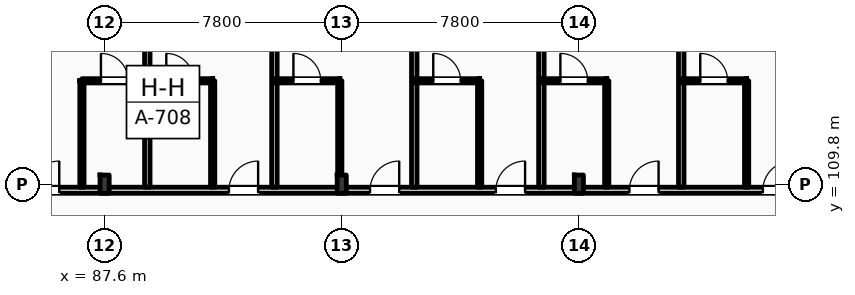
"""IFC4 building model, lengths in metres.
Left out: names, types, materials, properties, quantities, classifications, styles, units other than length and angle.
Written with IfcOpenShell. Run it as: python <this file> out.ifc"""

import sys

from ifc_helpers import new_model, si_unit, direction, frame, frame_2d, origin, origin_2d, place, context, subcontext, project, spatial, rectangle, i_section, extrude, element, fill, save


model = new_model("IFC4")
c1 = context("Model", 3, precision=1e-05, world=origin(), true_north=direction((0.0, 1.0)))
c2 = subcontext(c1, "Body", "Model", "MODEL_VIEW")
j1 = project(units=[si_unit("LENGTHUNIT", "METRE"), si_unit("PLANEANGLEUNIT", "RADIAN")], contexts=[c1])
p1 = place(None, origin())
s1 = spatial("IfcSite", under=j1, at=p1, CompositionType="ELEMENT")
p2 = place(p1, origin())
s2 = spatial("IfcBuilding", under=s1, at=p2, CompositionType="ELEMENT")
p3 = place(p2, frame((0.0, 0.0, 16.2)))
s3 = spatial("IfcBuildingStorey", under=s2, at=p3, CompositionType="ELEMENT", Elevation=16.2)
for number, where, z_axis, x_axis in (
    (1, (87.6, 109.8, 0.0), (0.0, 0.0, 1.0), (1.0, 0.0, 0.0)),
    (2, (95.4, 109.8, 0.0), (0.0, 0.0, 1.0), (1.0, 0.0, 0.0)),
    (3, (103.2, 109.8, 0.0), (0.0, 0.0, 1.0), (1.0, 0.0, 0.0)),
):
    element("IfcColumn", number, at=place(p3, frame(where, z_axis=z_axis, x_axis=x_axis)), inside=s3, PredefinedType="COLUMN", context=c2, shape_type="SweptSolid", body=[
        extrude(i_section(OverallWidth=0.3, OverallDepth=0.6, WebThickness=0.015, FlangeThickness=0.03, FilletRadius=0.027, at=origin_2d()), origin(), (0.0, 0.0, 1.0), 4.2),
    ])
p4 = place(p3, frame((10.65, 109.6, 0.0), z_axis=(0.0, 0.0, 1.0), x_axis=(1.0, 0.0, 0.0)))
e4 = element("IfcWall", 4, at=p4, inside=s3, PredefinedType="PARTITIONING", context=c2, shape_type="SweptSolid", body=[
    extrude(rectangle(XDim=109.21, YDim=0.2, at=frame_2d((54.605, 0.0))), origin(), (0.0, 0.0, 1.0), 3.36),
])
p5 = place(p4, frame((15.43, 0.0, 0.0)))
e5 = element("IfcOpeningElement", 5, at=p5, cuts=e4, PredefinedType="OPENING", context=c2, shape_type="SweptSolid", body=[
    extrude(rectangle(XDim=1.02, YDim=2.2, at=frame_2d((0.51, 1.1))), frame((0.0, 0.11, 0.0), z_axis=(0.0, -1.0, 0.0), x_axis=(1.0, 0.0, 0.0)), (0.0, 0.0, 1.0), 0.22),
])
p6 = place(p4, frame((19.537, 0.0, 0.0)))
e6 = element("IfcOpeningElement", 6, at=p6, cuts=e4, PredefinedType="OPENING", context=c2, shape_type="SweptSolid", body=[
    extrude(rectangle(XDim=1.02, YDim=2.2, at=frame_2d((0.51, 1.1))), frame((0.0, 0.11, 0.0), z_axis=(0.0, -1.0, 0.0), x_axis=(1.0, 0.0, 0.0)), (0.0, 0.0, 1.0), 0.22),
])
p7 = place(p4, frame((23.928, 0.0, 0.0)))
e7 = element("IfcOpeningElement", 7, at=p7, cuts=e4, PredefinedType="OPENING", context=c2, shape_type="SweptSolid", body=[
    extrude(rectangle(XDim=1.02, YDim=2.2, at=frame_2d((0.51, 1.1))), frame((0.0, 0.11, 0.0), z_axis=(0.0, -1.0, 0.0), x_axis=(1.0, 0.0, 0.0)), (0.0, 0.0, 1.0), 0.22),
])
p8 = place(p4, frame((26.169, 0.0, 0.0)))
e8 = element("IfcOpeningElement", 8, at=p8, cuts=e4, PredefinedType="OPENING", context=c2, shape_type="SweptSolid", body=[
    extrude(rectangle(XDim=1.02, YDim=2.2, at=frame_2d((0.51, 1.1))), frame((0.0, 0.11, 0.0), z_axis=(0.0, -1.0, 0.0), x_axis=(1.0, 0.0, 0.0)), (0.0, 0.0, 1.0), 0.22),
])
p9 = place(p4, frame((32.739, 0.0, 0.0)))
e9 = element("IfcOpeningElement", 9, at=p9, cuts=e4, PredefinedType="OPENING", context=c2, shape_type="SweptSolid", body=[
    extrude(rectangle(XDim=0.96, YDim=2.2, at=frame_2d((0.48, 1.1))), frame((0.0, 0.11, 0.0), z_axis=(0.0, -1.0, 0.0), x_axis=(1.0, 0.0, 0.0)), (0.0, 0.0, 1.0), 0.22),
])
p10 = place(p4, frame((34.98, 0.0, 0.0)))
e10 = element("IfcOpeningElement", 10, at=p10, cuts=e4, PredefinedType="OPENING", context=c2, shape_type="SweptSolid", body=[
    extrude(rectangle(XDim=0.96, YDim=2.2, at=frame_2d((0.48, 1.1))), frame((0.0, 0.11, 0.0), z_axis=(0.0, -1.0, 0.0), x_axis=(1.0, 0.0, 0.0)), (0.0, 0.0, 1.0), 0.22),
])
p11 = place(p4, frame((41.521, 0.0, 0.0)))
e11 = element("IfcOpeningElement", 11, at=p11, cuts=e4, PredefinedType="OPENING", context=c2, shape_type="SweptSolid", body=[
    extrude(rectangle(XDim=0.96, YDim=2.2, at=frame_2d((0.48, 1.1))), frame((0.0, 0.11, 0.0), z_axis=(0.0, -1.0, 0.0), x_axis=(1.0, 0.0, 0.0)), (0.0, 0.0, 1.0), 0.22),
])
p12 = place(p4, frame((43.512, 0.0, 0.0)))
e12 = element("IfcOpeningElement", 12, at=p12, cuts=e4, PredefinedType="OPENING", context=c2, shape_type="SweptSolid", body=[
    extrude(rectangle(XDim=0.96, YDim=2.2, at=frame_2d((0.48, 1.1))), frame((0.0, 0.11, 0.0), z_axis=(0.0, -1.0, 0.0), x_axis=(1.0, 0.0, 0.0)), (0.0, 0.0, 1.0), 0.22),
])
p13 = place(p4, frame((50.303, 0.0, 0.0)))
e13 = element("IfcOpeningElement", 13, at=p13, cuts=e4, PredefinedType="OPENING", context=c2, shape_type="SweptSolid", body=[
    extrude(rectangle(XDim=0.96, YDim=2.2, at=frame_2d((0.48, 1.1))), frame((0.0, 0.11, 0.0), z_axis=(0.0, -1.0, 0.0), x_axis=(1.0, 0.0, 0.0)), (0.0, 0.0, 1.0), 0.22),
])
p14 = place(p4, frame((54.944, 0.0, 0.0)))
e14 = element("IfcOpeningElement", 14, at=p14, cuts=e4, PredefinedType="OPENING", context=c2, shape_type="SweptSolid", body=[
    extrude(rectangle(XDim=0.96, YDim=2.2, at=frame_2d((0.48, 1.1))), frame((0.0, 0.11, 0.0), z_axis=(0.0, -1.0, 0.0), x_axis=(1.0, 0.0, 0.0)), (0.0, 0.0, 1.0), 0.22),
])
p15 = place(p4, frame((59.085, 0.0, 0.0)))
e15 = element("IfcOpeningElement", 15, at=p15, cuts=e4, PredefinedType="OPENING", context=c2, shape_type="SweptSolid", body=[
    extrude(rectangle(XDim=0.96, YDim=2.2, at=frame_2d((0.48, 1.1))), frame((0.0, 0.11, 0.0), z_axis=(0.0, -1.0, 0.0), x_axis=(1.0, 0.0, 0.0)), (0.0, 0.0, 1.0), 0.22),
])
p16 = place(p4, frame((63.476, 0.0, 0.0)))
e16 = element("IfcOpeningElement", 16, at=p16, cuts=e4, PredefinedType="OPENING", context=c2, shape_type="SweptSolid", body=[
    extrude(rectangle(XDim=0.96, YDim=2.2, at=frame_2d((0.48, 1.1))), frame((0.0, 0.11, 0.0), z_axis=(0.0, -1.0, 0.0), x_axis=(1.0, 0.0, 0.0)), (0.0, 0.0, 1.0), 0.22),
])
p17 = place(p4, frame((65.716, 0.0, 0.0)))
e17 = element("IfcOpeningElement", 17, at=p17, cuts=e4, PredefinedType="OPENING", context=c2, shape_type="SweptSolid", body=[
    extrude(rectangle(XDim=0.96, YDim=2.2, at=frame_2d((0.48, 1.1))), frame((0.0, 0.11, 0.0), z_axis=(0.0, -1.0, 0.0), x_axis=(1.0, 0.0, 0.0)), (0.0, 0.0, 1.0), 0.22),
])
p18 = place(p4, frame((72.257, 0.0, 0.0)))
e18 = element("IfcOpeningElement", 18, at=p18, cuts=e4, PredefinedType="OPENING", context=c2, shape_type="SweptSolid", body=[
    extrude(rectangle(XDim=0.96, YDim=2.2, at=frame_2d((0.48, 1.1))), frame((0.0, 0.11, 0.0), z_axis=(0.0, -1.0, 0.0), x_axis=(1.0, 0.0, 0.0)), (0.0, 0.0, 1.0), 0.22),
])
p19 = place(p4, frame((74.498, 0.0, 0.0)))
e19 = element("IfcOpeningElement", 19, at=p19, cuts=e4, PredefinedType="OPENING", context=c2, shape_type="SweptSolid", body=[
    extrude(rectangle(XDim=0.96, YDim=2.2, at=frame_2d((0.48, 1.1))), frame((0.0, 0.11, 0.0), z_axis=(0.0, -1.0, 0.0), x_axis=(1.0, 0.0, 0.0)), (0.0, 0.0, 1.0), 0.22),
])
p20 = place(p4, frame((81.039, 0.0, 0.0)))
e20 = element("IfcOpeningElement", 20, at=p20, cuts=e4, PredefinedType="OPENING", context=c2, shape_type="SweptSolid", body=[
    extrude(rectangle(XDim=0.96, YDim=2.2, at=frame_2d((0.48, 1.1))), frame((0.0, 0.11, 0.0), z_axis=(0.0, -1.0, 0.0), x_axis=(1.0, 0.0, 0.0)), (0.0, 0.0, 1.0), 0.22),
])
p21 = place(p4, frame((85.68, 0.0, 0.0)))
e21 = element("IfcOpeningElement", 21, at=p21, cuts=e4, PredefinedType="OPENING", context=c2, shape_type="SweptSolid", body=[
    extrude(rectangle(XDim=0.96, YDim=2.2, at=frame_2d((0.48, 1.1))), frame((0.0, 0.11, 0.0), z_axis=(0.0, -1.0, 0.0), x_axis=(1.0, 0.0, 0.0)), (0.0, 0.0, 1.0), 0.22),
])
p22 = place(p4, frame((89.82, 0.0, 0.0)))
e22 = element("IfcOpeningElement", 22, at=p22, cuts=e4, PredefinedType="OPENING", context=c2, shape_type="SweptSolid", body=[
    extrude(rectangle(XDim=0.96, YDim=2.2, at=frame_2d((0.48, 1.1))), frame((0.0, 0.11, 0.0), z_axis=(0.0, -1.0, 0.0), x_axis=(1.0, 0.0, 0.0)), (0.0, 0.0, 1.0), 0.22),
])
p23 = place(p4, frame((94.211, 0.0, 0.0)))
e23 = element("IfcOpeningElement", 23, at=p23, cuts=e4, PredefinedType="OPENING", context=c2, shape_type="SweptSolid", body=[
    extrude(rectangle(XDim=0.96, YDim=2.2, at=frame_2d((0.48, 1.1))), frame((0.0, 0.11, 0.0), z_axis=(0.0, -1.0, 0.0), x_axis=(1.0, 0.0, 0.0)), (0.0, 0.0, 1.0), 0.22),
])
p24 = place(p4, frame((98.602, 0.0, 0.0)))
e24 = element("IfcOpeningElement", 24, at=p24, cuts=e4, PredefinedType="OPENING", context=c2, shape_type="SweptSolid", body=[
    extrude(rectangle(XDim=0.96, YDim=2.2, at=frame_2d((0.48, 1.1))), frame((0.0, 0.11, 0.0), z_axis=(0.0, -1.0, 0.0), x_axis=(1.0, 0.0, 0.0)), (0.0, 0.0, 1.0), 0.22),
])
p25 = place(p4, frame((102.993, 0.0, 0.0)))
e25 = element("IfcOpeningElement", 25, at=p25, cuts=e4, PredefinedType="OPENING", context=c2, shape_type="SweptSolid", body=[
    extrude(rectangle(XDim=0.96, YDim=2.2, at=frame_2d((0.48, 1.1))), frame((0.0, 0.11, 0.0), z_axis=(0.0, -1.0, 0.0), x_axis=(1.0, 0.0, 0.0)), (0.0, 0.0, 1.0), 0.22),
])
p26 = place(p4, frame((105.269, 0.0, 0.0)))
e26 = element("IfcOpeningElement", 26, at=p26, cuts=e4, PredefinedType="OPENING", context=c2, shape_type="SweptSolid", body=[
    extrude(rectangle(XDim=0.96, YDim=2.2, at=frame_2d((0.48, 1.1))), frame((0.0, 0.11, 0.0), z_axis=(0.0, -1.0, 0.0), x_axis=(1.0, 0.0, 0.0)), (0.0, 0.0, 1.0), 0.22),
])
p27 = place(p4, frame((2.716, 0.0, 0.0)))
e27 = element("IfcOpeningElement", 27, at=p27, cuts=e4, PredefinedType="OPENING", context=c2, shape_type="SweptSolid", body=[
    extrude(rectangle(XDim=1.35, YDim=2.25, at=frame_2d((0.675, 1.125))), frame((0.0, 0.11, 0.0), z_axis=(0.0, -1.0, 0.0), x_axis=(1.0, 0.0, 0.0)), (0.0, 0.0, 1.0), 0.22),
])
p28 = place(p4, frame((6.65, 0.0, 0.0)))
e28 = element("IfcOpeningElement", 28, at=p28, cuts=e4, PredefinedType="OPENING", context=c2, shape_type="SweptSolid", body=[
    extrude(rectangle(XDim=1.35, YDim=2.25, at=frame_2d((0.675, 1.125))), frame((0.0, 0.11, 0.0), z_axis=(0.0, -1.0, 0.0), x_axis=(1.0, 0.0, 0.0)), (0.0, 0.0, 1.0), 0.22),
])
p29 = place(p4, frame((10.583, 0.0, 0.0)))
e29 = element("IfcOpeningElement", 29, at=p29, cuts=e4, PredefinedType="OPENING", context=c2, shape_type="SweptSolid", body=[
    extrude(rectangle(XDim=1.35, YDim=2.25, at=frame_2d((0.675, 1.125))), frame((0.0, 0.11, 0.0), z_axis=(0.0, -1.0, 0.0), x_axis=(1.0, 0.0, 0.0)), (0.0, 0.0, 1.0), 0.22),
])
p30 = place(p3, frame((89.004, 109.7, 0.0), z_axis=(0.0, 0.0, 1.0), x_axis=(0.0, 1.0, 0.0)))
e30 = element("IfcWall", 30, at=p30, inside=s3, PredefinedType="PARTITIONING", context=c2, shape_type="SweptSolid", body=[
    extrude(rectangle(XDim=8.15, YDim=0.18, at=frame_2d((4.075, 0.0))), origin(), (0.0, 0.0, 1.0), 3.92),
])
p31 = place(p3, frame((86.854, 109.7, 0.0), z_axis=(0.0, 0.0, 1.0), x_axis=(0.0, 1.0, 0.0)))
e31 = element("IfcWall", 31, at=p31, inside=s3, PredefinedType="PARTITIONING", context=c2, shape_type="SweptSolid", body=[
    extrude(rectangle(XDim=3.5, YDim=0.14, at=frame_2d((1.75, 0.0))), origin(), (0.0, 0.0, 1.0), 3.92),
])
p32 = place(p3, frame((86.854, 113.2, 0.0), z_axis=(0.0, 0.0, 1.0), x_axis=(1.0, 0.0, 0.0)))
e32 = element("IfcWall", 32, at=p32, inside=s3, PredefinedType="PARTITIONING", context=c2, shape_type="SweptSolid", body=[
    extrude(rectangle(XDim=2.15, YDim=0.14, at=frame_2d((1.075, 0.0))), origin(), (0.0, 0.0, 1.0), 3.92),
])
p33 = place(p32, frame((0.625, 0.0, 0.0)))
e33 = element("IfcOpeningElement", 33, at=p33, cuts=e32, PredefinedType="OPENING", context=c2, shape_type="SweptSolid", body=[
    extrude(rectangle(XDim=0.9, YDim=2.1, at=frame_2d((0.45, 1.05))), frame((0.0, 0.08, 0.0), z_axis=(0.0, -1.0, 0.0), x_axis=(1.0, 0.0, 0.0)), (0.0, 0.0, 1.0), 0.16),
])
p34 = place(p3, frame((93.185, 109.7, 0.0), z_axis=(0.0, 0.0, 1.0), x_axis=(0.0, 1.0, 0.0)))
e34 = element("IfcWall", 34, at=p34, inside=s3, PredefinedType="PARTITIONING", context=c2, shape_type="SweptSolid", body=[
    extrude(rectangle(XDim=8.15, YDim=0.18, at=frame_2d((4.075, 0.0))), origin(), (0.0, 0.0, 1.0), 3.92),
])
p35 = place(p3, frame((91.154, 109.7, 0.0), z_axis=(0.0, 0.0, 1.0), x_axis=(0.0, 1.0, 0.0)))
e35 = element("IfcWall", 35, at=p35, inside=s3, PredefinedType="PARTITIONING", context=c2, shape_type="SweptSolid", body=[
    extrude(rectangle(XDim=3.5, YDim=0.14, at=frame_2d((1.75, 0.0))), origin(), (0.0, 0.0, 1.0), 3.92),
])
p36 = place(p3, frame((89.004, 113.2, 0.0), z_axis=(0.0, 0.0, 1.0), x_axis=(1.0, 0.0, 0.0)))
e36 = element("IfcWall", 36, at=p36, inside=s3, PredefinedType="PARTITIONING", context=c2, shape_type="SweptSolid", body=[
    extrude(rectangle(XDim=2.15, YDim=0.14, at=frame_2d((1.075, 0.0))), origin(), (0.0, 0.0, 1.0), 3.92),
])
p37 = place(p36, frame((0.625, 0.0, 0.0)))
e37 = element("IfcOpeningElement", 37, at=p37, cuts=e36, PredefinedType="OPENING", context=c2, shape_type="SweptSolid", body=[
    extrude(rectangle(XDim=0.9, YDim=2.1, at=frame_2d((0.45, 1.05))), frame((0.0, 0.08, 0.0), z_axis=(0.0, -1.0, 0.0), x_axis=(1.0, 0.0, 0.0)), (0.0, 0.0, 1.0), 0.16),
])
p38 = place(p3, frame((97.785, 109.7, 0.0), z_axis=(0.0, 0.0, 1.0), x_axis=(0.0, 1.0, 0.0)))
e38 = element("IfcWall", 38, at=p38, inside=s3, PredefinedType="PARTITIONING", context=c2, shape_type="SweptSolid", body=[
    extrude(rectangle(XDim=8.15, YDim=0.18, at=frame_2d((4.075, 0.0))), origin(), (0.0, 0.0, 1.0), 3.61),
])
p39 = place(p3, frame((95.335, 109.7, 0.0), z_axis=(0.0, 0.0, 1.0), x_axis=(0.0, 1.0, 0.0)))
e39 = element("IfcWall", 39, at=p39, inside=s3, PredefinedType="PARTITIONING", context=c2, shape_type="SweptSolid", body=[
    extrude(rectangle(XDim=3.5, YDim=0.14, at=frame_2d((1.75, 0.0))), origin(), (0.0, 0.0, 1.0), 3.51),
])
p40 = place(p3, frame((93.185, 113.2, 0.0), z_axis=(0.0, 0.0, 1.0), x_axis=(1.0, 0.0, 0.0)))
e40 = element("IfcWall", 40, at=p40, inside=s3, PredefinedType="PARTITIONING", context=c2, shape_type="SweptSolid", body=[
    extrude(rectangle(XDim=2.15, YDim=0.14, at=frame_2d((1.075, 0.0))), origin(), (0.0, 0.0, 1.0), 3.92),
])
p41 = place(p40, frame((0.625, 0.0, 0.0)))
e41 = element("IfcOpeningElement", 41, at=p41, cuts=e40, PredefinedType="OPENING", context=c2, shape_type="SweptSolid", body=[
    extrude(rectangle(XDim=0.9, YDim=2.1, at=frame_2d((0.45, 1.05))), frame((0.0, 0.08, 0.0), z_axis=(0.0, -1.0, 0.0), x_axis=(1.0, 0.0, 0.0)), (0.0, 0.0, 1.0), 0.16),
])
p42 = place(p3, frame((101.966, 109.7, 0.0), z_axis=(0.0, 0.0, 1.0), x_axis=(0.0, 1.0, 0.0)))
e42 = element("IfcWall", 42, at=p42, inside=s3, PredefinedType="PARTITIONING", context=c2, shape_type="SweptSolid", body=[
    extrude(rectangle(XDim=8.15, YDim=0.18, at=frame_2d((4.075, 0.0))), origin(), (0.0, 0.0, 1.0), 3.92),
])
p43 = place(p3, frame((99.935, 109.7, 0.0), z_axis=(0.0, 0.0, 1.0), x_axis=(0.0, 1.0, 0.0)))
e43 = element("IfcWall", 43, at=p43, inside=s3, PredefinedType="PARTITIONING", context=c2, shape_type="SweptSolid", body=[
    extrude(rectangle(XDim=3.5, YDim=0.14, at=frame_2d((1.75, 0.0))), origin(), (0.0, 0.0, 1.0), 3.92),
])
p44 = place(p3, frame((97.785, 113.2, 0.0), z_axis=(0.0, 0.0, 1.0), x_axis=(1.0, 0.0, 0.0)))
e44 = element("IfcWall", 44, at=p44, inside=s3, PredefinedType="PARTITIONING", context=c2, shape_type="SweptSolid", body=[
    extrude(rectangle(XDim=2.15, YDim=0.14, at=frame_2d((1.075, 0.0))), origin(), (0.0, 0.0, 1.0), 3.92),
])
p45 = place(p44, frame((0.625, 0.0, 0.0)))
e45 = element("IfcOpeningElement", 45, at=p45, cuts=e44, PredefinedType="OPENING", context=c2, shape_type="SweptSolid", body=[
    extrude(rectangle(XDim=0.9, YDim=2.1, at=frame_2d((0.45, 1.05))), frame((0.0, 0.08, 0.0), z_axis=(0.0, -1.0, 0.0), x_axis=(1.0, 0.0, 0.0)), (0.0, 0.0, 1.0), 0.16),
])
p46 = place(p3, frame((106.567, 109.7, 0.0), z_axis=(0.0, 0.0, 1.0), x_axis=(0.0, 1.0, 0.0)))
e46 = element("IfcWall", 46, at=p46, inside=s3, PredefinedType="PARTITIONING", context=c2, shape_type="SweptSolid", body=[
    extrude(rectangle(XDim=8.15, YDim=0.18, at=frame_2d((4.075, 0.0))), origin(), (0.0, 0.0, 1.0), 3.92),
])
p47 = place(p3, frame((104.116, 109.7, 0.0), z_axis=(0.0, 0.0, 1.0), x_axis=(0.0, 1.0, 0.0)))
e47 = element("IfcWall", 47, at=p47, inside=s3, PredefinedType="PARTITIONING", context=c2, shape_type="SweptSolid", body=[
    extrude(rectangle(XDim=3.5, YDim=0.14, at=frame_2d((1.75, 0.0))), origin(), (0.0, 0.0, 1.0), 3.92),
])
p48 = place(p3, frame((101.966, 113.2, 0.0), z_axis=(0.0, 0.0, 1.0), x_axis=(1.0, 0.0, 0.0)))
e48 = element("IfcWall", 48, at=p48, inside=s3, PredefinedType="PARTITIONING", context=c2, shape_type="SweptSolid", body=[
    extrude(rectangle(XDim=2.15, YDim=0.14, at=frame_2d((1.075, 0.0))), origin(), (0.0, 0.0, 1.0), 3.92),
])
p49 = place(p48, frame((0.625, 0.0, 0.0)))
e49 = element("IfcOpeningElement", 49, at=p49, cuts=e48, PredefinedType="OPENING", context=c2, shape_type="SweptSolid", body=[
    extrude(rectangle(XDim=0.9, YDim=2.1, at=frame_2d((0.45, 1.05))), frame((0.0, 0.08, 0.0), z_axis=(0.0, -1.0, 0.0), x_axis=(1.0, 0.0, 0.0)), (0.0, 0.0, 1.0), 0.16),
])
p50 = place(p3, frame((108.717, 109.7, 0.0), z_axis=(0.0, 0.0, 1.0), x_axis=(0.0, 1.0, 0.0)))
e50 = element("IfcWall", 50, at=p50, inside=s3, PredefinedType="PARTITIONING", context=c2, shape_type="SweptSolid", body=[
    extrude(rectangle(XDim=3.5, YDim=0.14, at=frame_2d((1.75, 0.0))), origin(), (0.0, 0.0, 1.0), 3.61),
])
p51 = place(p3, frame((106.567, 113.2, 0.0), z_axis=(0.0, 0.0, 1.0), x_axis=(1.0, 0.0, 0.0)))
e51 = element("IfcWall", 51, at=p51, inside=s3, PredefinedType="PARTITIONING", context=c2, shape_type="SweptSolid", body=[
    extrude(rectangle(XDim=2.15, YDim=0.14, at=frame_2d((1.075, 0.0))), origin(), (0.0, 0.0, 1.0), 3.92),
])
p52 = place(p51, frame((0.625, 0.0, 0.0)))
e52 = element("IfcOpeningElement", 52, at=p52, cuts=e51, PredefinedType="OPENING", context=c2, shape_type="SweptSolid", body=[
    extrude(rectangle(XDim=0.9, YDim=2.1, at=frame_2d((0.45, 1.05))), frame((0.0, 0.08, 0.0), z_axis=(0.0, -1.0, 0.0), x_axis=(1.0, 0.0, 0.0)), (0.0, 0.0, 1.0), 0.16),
])
p53 = place(p19, origin())
e53 = element("IfcDoor", 53, at=p53, inside=s3, OperationType="SINGLE_SWING_RIGHT", PredefinedType="DOOR", context=c2, shape_type="SweptSolid", body=[
    extrude(rectangle(XDim=0.96, YDim=2.2, at=frame_2d((0.48, 1.1))), frame((0.0, 0.025, 0.0), z_axis=(0.0, -1.0, 0.0), x_axis=(1.0, 0.0, 0.0)), (0.0, 0.0, 1.0), 0.05),
])
fill(e19, e53)
p54 = place(p33, origin())
e54 = element("IfcDoor", 54, at=p54, inside=s3, OperationType="SINGLE_SWING_LEFT", PredefinedType="DOOR", context=c2, shape_type="SweptSolid", body=[
    extrude(rectangle(XDim=0.9, YDim=2.1, at=frame_2d((0.45, 1.05))), frame((0.0, 0.025, 0.0), z_axis=(0.0, -1.0, 0.0), x_axis=(1.0, 0.0, 0.0)), (0.0, 0.0, 1.0), 0.05),
])
fill(e33, e54)
p55 = place(p20, origin())
e55 = element("IfcDoor", 55, at=p55, inside=s3, OperationType="SINGLE_SWING_RIGHT", PredefinedType="DOOR", context=c2, shape_type="SweptSolid", body=[
    extrude(rectangle(XDim=0.96, YDim=2.2, at=frame_2d((0.48, 1.1))), frame((0.0, 0.025, 0.0), z_axis=(0.0, -1.0, 0.0), x_axis=(1.0, 0.0, 0.0)), (0.0, 0.0, 1.0), 0.05),
])
fill(e20, e55)
p56 = place(p37, origin())
e56 = element("IfcDoor", 56, at=p56, inside=s3, OperationType="SINGLE_SWING_LEFT", PredefinedType="DOOR", context=c2, shape_type="SweptSolid", body=[
    extrude(rectangle(XDim=0.9, YDim=2.1, at=frame_2d((0.45, 1.05))), frame((0.0, 0.025, 0.0), z_axis=(0.0, -1.0, 0.0), x_axis=(1.0, 0.0, 0.0)), (0.0, 0.0, 1.0), 0.05),
])
fill(e37, e56)
p57 = place(p21, origin())
e57 = element("IfcDoor", 57, at=p57, inside=s3, OperationType="SINGLE_SWING_RIGHT", PredefinedType="DOOR", context=c2, shape_type="SweptSolid", body=[
    extrude(rectangle(XDim=0.96, YDim=2.2, at=frame_2d((0.48, 1.1))), frame((0.0, 0.025, 0.0), z_axis=(0.0, -1.0, 0.0), x_axis=(1.0, 0.0, 0.0)), (0.0, 0.0, 1.0), 0.05),
])
fill(e21, e57)
p58 = place(p41, origin())
e58 = element("IfcDoor", 58, at=p58, inside=s3, OperationType="SINGLE_SWING_LEFT", PredefinedType="DOOR", context=c2, shape_type="SweptSolid", body=[
    extrude(rectangle(XDim=0.9, YDim=2.1, at=frame_2d((0.45, 1.05))), frame((0.0, 0.025, 0.0), z_axis=(0.0, -1.0, 0.0), x_axis=(1.0, 0.0, 0.0)), (0.0, 0.0, 1.0), 0.05),
])
fill(e41, e58)
p59 = place(p22, origin())
e59 = element("IfcDoor", 59, at=p59, inside=s3, OperationType="SINGLE_SWING_RIGHT", PredefinedType="DOOR", context=c2, shape_type="SweptSolid", body=[
    extrude(rectangle(XDim=0.96, YDim=2.2, at=frame_2d((0.48, 1.1))), frame((0.0, 0.025, 0.0), z_axis=(0.0, -1.0, 0.0), x_axis=(1.0, 0.0, 0.0)), (0.0, 0.0, 1.0), 0.05),
])
fill(e22, e59)
p60 = place(p45, origin())
e60 = element("IfcDoor", 60, at=p60, inside=s3, OperationType="SINGLE_SWING_LEFT", PredefinedType="DOOR", context=c2, shape_type="SweptSolid", body=[
    extrude(rectangle(XDim=0.9, YDim=2.1, at=frame_2d((0.45, 1.05))), frame((0.0, 0.025, 0.0), z_axis=(0.0, -1.0, 0.0), x_axis=(1.0, 0.0, 0.0)), (0.0, 0.0, 1.0), 0.05),
])
fill(e45, e60)
p61 = place(p23, origin())
e61 = element("IfcDoor", 61, at=p61, inside=s3, OperationType="SINGLE_SWING_RIGHT", PredefinedType="DOOR", context=c2, shape_type="SweptSolid", body=[
    extrude(rectangle(XDim=0.96, YDim=2.2, at=frame_2d((0.48, 1.1))), frame((0.0, 0.025, 0.0), z_axis=(0.0, -1.0, 0.0), x_axis=(1.0, 0.0, 0.0)), (0.0, 0.0, 1.0), 0.05),
])
fill(e23, e61)
p62 = place(p49, origin())
e62 = element("IfcDoor", 62, at=p62, inside=s3, OperationType="SINGLE_SWING_LEFT", PredefinedType="DOOR", context=c2, shape_type="SweptSolid", body=[
    extrude(rectangle(XDim=0.9, YDim=2.1, at=frame_2d((0.45, 1.05))), frame((0.0, 0.025, 0.0), z_axis=(0.0, -1.0, 0.0), x_axis=(1.0, 0.0, 0.0)), (0.0, 0.0, 1.0), 0.05),
])
fill(e49, e62)
p63 = place(p24, origin())
e63 = element("IfcDoor", 63, at=p63, inside=s3, OperationType="SINGLE_SWING_RIGHT", PredefinedType="DOOR", context=c2, shape_type="SweptSolid", body=[
    extrude(rectangle(XDim=0.96, YDim=2.2, at=frame_2d((0.48, 1.1))), frame((0.0, 0.025, 0.0), z_axis=(0.0, -1.0, 0.0), x_axis=(1.0, 0.0, 0.0)), (0.0, 0.0, 1.0), 0.05),
])
fill(e24, e63)
p64 = place(p52, origin())
e64 = element("IfcDoor", 64, at=p64, inside=s3, OperationType="SINGLE_SWING_LEFT", PredefinedType="DOOR", context=c2, shape_type="SweptSolid", body=[
    extrude(rectangle(XDim=0.9, YDim=2.1, at=frame_2d((0.45, 1.05))), frame((0.0, 0.025, 0.0), z_axis=(0.0, -1.0, 0.0), x_axis=(1.0, 0.0, 0.0)), (0.0, 0.0, 1.0), 0.05),
])
fill(e52, e64)
save(model, sys.argv[1])
